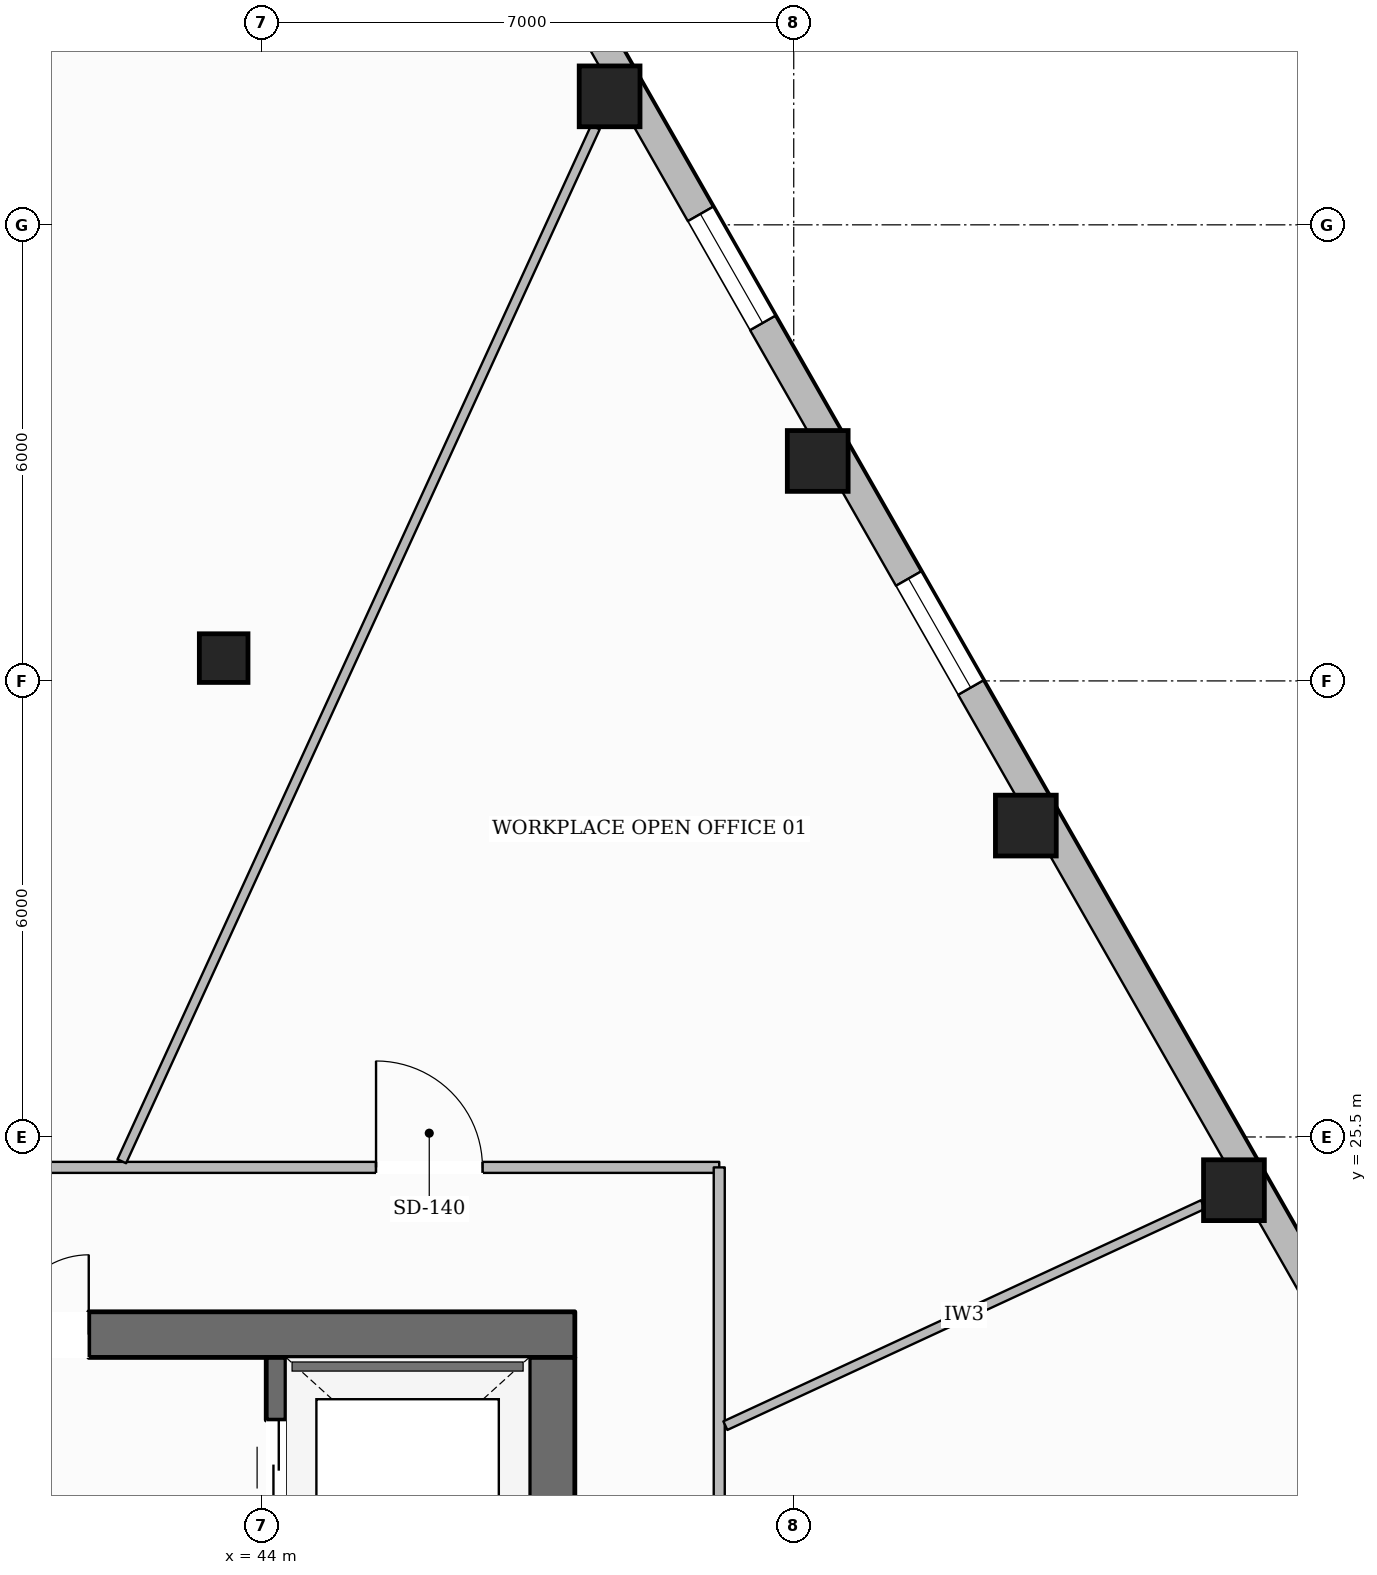
"""IFC4 building model, lengths in metres.
Left out: names, types, materials, properties, quantities, classifications, styles, units other than length and angle.
Written with IfcOpenShell. Run it as: python <this file> out.ifc"""

import sys

from ifc_helpers import new_model, si_unit, direction, frame, frame_2d, origin, origin_2d, place, context, subcontext, project, spatial, rectangle, hollow_rectangle, extrude, element, fill, save


model = new_model("IFC4")
c1 = context("Model", 3, precision=1e-05, world=origin(), true_north=direction((0.0, 1.0)))
c2 = subcontext(c1, "Body", "Model", "MODEL_VIEW")
j1 = project(units=[si_unit("LENGTHUNIT", "METRE"), si_unit("PLANEANGLEUNIT", "RADIAN")], contexts=[c1])
p1 = place(None, origin())
s1 = spatial("IfcSite", under=j1, at=p1, CompositionType="ELEMENT")
p2 = place(p1, origin())
s2 = spatial("IfcBuilding", under=s1, at=p2, CompositionType="ELEMENT")
p3 = place(p2, frame((0.0, 0.0, 21.4)))
s3 = spatial("IfcBuildingStorey", under=s2, at=p3, CompositionType="ELEMENT", Elevation=21.4)
p4 = place(p3, frame((27.88, 22.9, 0.0), z_axis=(0.0, 0.0, 1.0), x_axis=(1.0, 0.0, 0.0)))
e1 = element("IfcWall", 1, at=p4, inside=s3, PredefinedType="SOLIDWALL", context=c2, shape_type="SweptSolid", body=[
    extrude(rectangle(XDim=20.24, YDim=0.6, at=frame_2d((10.12, 0.0))), origin(), (0.0, 0.0, 1.0), 3.59),
])
p5 = place(p4, frame((6.395, 0.0, 0.0)))
e2 = element("IfcOpeningElement", 2, at=p5, cuts=e1, PredefinedType="OPENING", context=c2, shape_type="SweptSolid", body=[
    extrude(rectangle(XDim=1.05, YDim=2.15, at=frame_2d((0.525, 1.075))), frame((0.0, 0.31, 0.0), z_axis=(0.0, -1.0, 0.0), x_axis=(1.0, 0.0, 0.0)), (0.0, 0.0, 1.0), 0.62),
])
p6 = place(p4, frame((12.795, 0.0, 0.0)))
e3 = element("IfcOpeningElement", 3, at=p6, cuts=e1, PredefinedType="OPENING", context=c2, shape_type="SweptSolid", body=[
    extrude(rectangle(XDim=1.05, YDim=2.15, at=frame_2d((0.525, 1.075))), frame((0.0, 0.31, 0.0), z_axis=(0.0, -1.0, 0.0), x_axis=(1.0, 0.0, 0.0)), (0.0, 0.0, 1.0), 0.62),
])
p7 = place(p3, frame((47.82, 9.6, 0.0), z_axis=(0.0, 0.0, 1.0), x_axis=(0.0, 1.0, 0.0)))
e4 = element("IfcWall", 4, at=p7, inside=s3, PredefinedType="SOLIDWALL", context=c2, shape_type="SweptSolid", body=[
    extrude(rectangle(XDim=13.0, YDim=0.6, at=frame_2d((6.5, 0.0))), origin(), (0.0, 0.0, 1.0), 3.59),
])
p8 = place(p7, frame((0.2, 0.0, 0.0)))
e5 = element("IfcOpeningElement", 5, at=p8, cuts=e4, PredefinedType="OPENING", context=c2, shape_type="SweptSolid", body=[
    extrude(rectangle(XDim=1.1, YDim=2.15, at=frame_2d((0.55, 1.075))), frame((0.0, 0.31, 0.0), z_axis=(0.0, -1.0, 0.0), x_axis=(1.0, 0.0, 0.0)), (0.0, 0.0, 1.0), 0.62),
])
p9 = place(p7, frame((8.4, 0.0, 0.0)))
e6 = element("IfcOpeningElement", 6, at=p9, cuts=e4, PredefinedType="OPENING", context=c2, shape_type="SweptSolid", body=[
    extrude(rectangle(XDim=0.9, YDim=2.1, at=frame_2d((0.45, 1.05))), frame((0.0, 0.31, 0.0), z_axis=(0.0, -1.0, 0.0), x_axis=(1.0, 0.0, 0.0)), (0.0, 0.0, 1.0), 0.62),
])
p10 = place(p3, frame((44.19, 9.6, 0.0), z_axis=(0.0, 0.0, 1.0), x_axis=(0.0, 1.0, 0.0)))
e7 = element("IfcWall", 7, at=p10, inside=s3, PredefinedType="SHEAR", context=c2, shape_type="SweptSolid", body=[
    extrude(rectangle(XDim=13.0, YDim=0.26, at=frame_2d((6.5, 0.0))), origin(), (0.0, 0.0, 1.0), 3.59),
])
p11 = place(p10, frame((10.925, 0.0, 0.0)))
e8 = element("IfcOpeningElement", 8, at=p11, cuts=e7, PredefinedType="OPENING", context=c2, shape_type="SweptSolid", body=[
    extrude(rectangle(XDim=1.25, YDim=2.25, at=frame_2d((0.625, 1.125))), frame((0.0, 0.14, 0.0), z_axis=(0.0, -1.0, 0.0), x_axis=(1.0, 0.0, 0.0)), (0.0, 0.0, 1.0), 0.28),
])
for number, where, z_axis, x_axis in (
    (9, (56.792, 24.8, 0.0), (0.0, 0.0, 1.0), (1.0, 0.0, 0.0)),
    (10, (54.054, 29.597, 0.0), (0.0, 0.0, 1.0), (1.0, 0.0, 0.0)),
    (11, (51.316, 34.394, 0.0), (0.0, 0.0, 1.0), (1.0, 0.0, 0.0)),
    (12, (48.578, 39.19, 0.0), (0.0, 0.0, 1.0), (1.0, 0.0, 0.0)),
):
    element("IfcColumn", number, at=place(p3, frame(where, z_axis=z_axis, x_axis=x_axis)), inside=s3, PredefinedType="COLUMN", context=c2, shape_type="SweptSolid", body=[
        extrude(hollow_rectangle(XDim=0.8, YDim=0.8, WallThickness=0.036, at=origin_2d()), origin(), (0.0, 0.0, 1.0), 3.59),
    ])
p12 = place(p3, frame((43.5, 31.8, 0.0), z_axis=(0.0, 0.0, 1.0), x_axis=(1.0, 0.0, 0.0)))
e13 = element("IfcColumn", 13, at=p12, inside=s3, PredefinedType="COLUMN", context=c2, shape_type="SweptSolid", body=[
    extrude(hollow_rectangle(XDim=0.64, YDim=0.64, WallThickness=0.028, at=origin_2d()), origin(), (0.0, 0.0, 1.0), 3.59),
])
p13 = place(p3, frame((45.837, 44.537, 0.0), z_axis=(0.0, 0.0, 1.0), x_axis=(0.495711630902, -0.868487178367, 0.0)))
e14 = element("IfcWall", 14, at=p13, inside=s3, PredefinedType="STANDARD", context=c2, shape_type="SweptSolid", body=[
    extrude(rectangle(XDim=34.092, YDim=0.38, at=frame_2d((17.046, 0.0))), origin(), (0.0, 0.0, 1.0), 2.97),
])
p14 = place(p13, frame((30.031, 0.0, 0.65)))
e15 = element("IfcOpeningElement", 15, at=p14, cuts=e14, PredefinedType="OPENING", context=c2, shape_type="SweptSolid", body=[
    extrude(rectangle(XDim=1.65, YDim=1.75, at=frame_2d((0.825, 0.875))), frame((0.0, 0.2, 0.0), z_axis=(0.0, -1.0, 0.0), x_axis=(1.0, 0.0, 0.0)), (0.0, 0.0, 1.0), 0.4),
])
p15 = place(p13, frame((24.508, 0.0, 0.65)))
e16 = element("IfcOpeningElement", 16, at=p15, cuts=e14, PredefinedType="OPENING", context=c2, shape_type="SweptSolid", body=[
    extrude(rectangle(XDim=1.65, YDim=1.75, at=frame_2d((0.825, 0.875))), frame((0.0, 0.2, 0.0), z_axis=(0.0, -1.0, 0.0), x_axis=(1.0, 0.0, 0.0)), (0.0, 0.0, 1.0), 0.4),
])
p16 = place(p13, frame((13.462, 0.0, 0.65)))
e17 = element("IfcOpeningElement", 17, at=p16, cuts=e14, PredefinedType="OPENING", context=c2, shape_type="SweptSolid", body=[
    extrude(rectangle(XDim=1.65, YDim=1.75, at=frame_2d((0.825, 0.875))), frame((0.0, 0.2, 0.0), z_axis=(0.0, -1.0, 0.0), x_axis=(1.0, 0.0, 0.0)), (0.0, 0.0, 1.0), 0.4),
])
p17 = place(p13, frame((7.939, 0.0, 0.65)))
e18 = element("IfcOpeningElement", 18, at=p17, cuts=e14, PredefinedType="OPENING", context=c2, shape_type="SweptSolid", body=[
    extrude(rectangle(XDim=1.65, YDim=1.75, at=frame_2d((0.825, 0.875))), frame((0.0, 0.2, 0.0), z_axis=(0.0, -1.0, 0.0), x_axis=(1.0, 0.0, 0.0)), (0.0, 0.0, 1.0), 0.4),
])
p18 = place(p13, frame((2.415, 0.0, 0.65)))
e19 = element("IfcOpeningElement", 19, at=p18, cuts=e14, PredefinedType="OPENING", context=c2, shape_type="SweptSolid", body=[
    extrude(rectangle(XDim=1.65, YDim=1.75, at=frame_2d((0.825, 0.875))), frame((0.0, 0.2, 0.0), z_axis=(0.0, -1.0, 0.0), x_axis=(1.0, 0.0, 0.0)), (0.0, 0.0, 1.0), 0.4),
])
p19 = place(p3, frame((39.0, 25.1, 0.0), z_axis=(0.0, 0.0, 1.0), x_axis=(1.0, 0.0, 0.0)))
e20 = element("IfcWall", 20, at=p19, inside=s3, PredefinedType="PARTITIONING", context=c2, shape_type="SweptSolid", body=[
    extrude(rectangle(XDim=11.02, YDim=0.145, at=frame_2d((5.51, 0.0))), origin(), (0.0, 0.0, 1.0), 3.59),
])
p20 = place(p19, frame((6.505, 0.0, 0.0)))
e21 = element("IfcOpeningElement", 21, at=p20, cuts=e20, PredefinedType="OPENING", context=c2, shape_type="SweptSolid", body=[
    extrude(rectangle(XDim=1.4, YDim=2.2, at=frame_2d((0.7, 1.1))), frame((0.0, 0.083, 0.0), z_axis=(0.0, -1.0, 0.0), x_axis=(1.0, 0.0, 0.0)), (0.0, 0.0, 1.0), 0.165),
])
p21 = place(p3, frame((50.02, 25.1, 0.0), z_axis=(0.0, 0.0, 1.0), x_axis=(0.0, -1.0, 0.0)))
e22 = element("IfcWall", 22, at=p21, inside=s3, PredefinedType="PARTITIONING", context=c2, shape_type="SweptSolid", body=[
    extrude(rectangle(XDim=16.0, YDim=0.145, at=frame_2d((8.0, 0.0))), origin(), (0.0, 0.0, 1.0), 3.278),
])
p22 = place(p21, frame((8.916, 0.0, 0.0)))
e23 = element("IfcOpeningElement", 23, at=p22, cuts=e22, PredefinedType="OPENING", context=c2, shape_type="SweptSolid", body=[
    extrude(rectangle(XDim=1.4, YDim=2.2, at=frame_2d((0.7, 1.1))), frame((0.0, 0.083, 0.0), z_axis=(0.0, -1.0, 0.0), x_axis=(1.0, 0.0, 0.0)), (0.0, 0.0, 1.0), 0.165),
])
p23 = place(p3, frame((50.101, 21.702, 0.0), z_axis=(0.0, 0.0, 1.0), x_axis=(0.907458193586, 0.420142388832, 0.0)))
e24 = element("IfcWall", 24, at=p23, inside=s3, PredefinedType="PARTITIONING", context=c2, shape_type="SweptSolid", body=[
    extrude(rectangle(XDim=6.924, YDim=0.125, at=frame_2d((3.462, 0.0))), origin(), (0.0, 0.0, 1.0), 3.057),
])
p24 = place(p3, frame((42.16, 25.18, 0.0), z_axis=(0.0, 0.0, 1.0), x_axis=(0.416471526835, 0.90914875974, 0.0)))
e25 = element("IfcWall", 25, at=p24, inside=s3, PredefinedType="PARTITIONING", context=c2, shape_type="SweptSolid", body=[
    extrude(rectangle(XDim=14.961, YDim=0.125, at=frame_2d((7.481, 0.0))), origin(), (0.0, 0.0, 1.0), 3.057),
])
p25 = place(p16, origin())
e26 = element("IfcWindow", 26, at=p25, inside=s3, PartitioningType="SINGLE_PANEL", PredefinedType="WINDOW", context=c2, shape_type="SweptSolid", body=[
    extrude(rectangle(XDim=1.65, YDim=1.75, at=frame_2d((0.825, 0.875))), frame((0.0, 0.03, 0.0), z_axis=(0.0, -1.0, 0.0), x_axis=(1.0, 0.0, 0.0)), (0.0, 0.0, 1.0), 0.06),
])
fill(e17, e26)
p26 = place(p17, origin())
e27 = element("IfcWindow", 27, at=p26, inside=s3, PartitioningType="SINGLE_PANEL", PredefinedType="WINDOW", context=c2, shape_type="SweptSolid", body=[
    extrude(rectangle(XDim=1.65, YDim=1.75, at=frame_2d((0.825, 0.875))), frame((0.0, 0.03, 0.0), z_axis=(0.0, -1.0, 0.0), x_axis=(1.0, 0.0, 0.0)), (0.0, 0.0, 1.0), 0.06),
])
fill(e18, e27)
p27 = place(p6, origin())
e28 = element("IfcDoor", 28, at=p27, inside=s3, OperationType="SINGLE_SWING_RIGHT", PredefinedType="DOOR", context=c2, shape_type="SweptSolid", body=[
    extrude(rectangle(XDim=1.05, YDim=2.15, at=frame_2d((0.525, 1.075))), frame((0.0, 0.025, 0.0), z_axis=(0.0, -1.0, 0.0), x_axis=(1.0, 0.0, 0.0)), (0.0, 0.0, 1.0), 0.05),
])
fill(e3, e28)
p28 = place(p11, origin())
e29 = element("IfcDoor", 29, at=p28, inside=s3, OperationType="DOUBLE_DOOR_SLIDING", PredefinedType="DOOR", context=c2, shape_type="SweptSolid", body=[
    extrude(rectangle(XDim=1.25, YDim=2.25, at=frame_2d((0.625, 1.125))), frame((0.0, 0.025, 0.0), z_axis=(0.0, -1.0, 0.0), x_axis=(1.0, 0.0, 0.0)), (0.0, 0.0, 1.0), 0.05),
])
fill(e8, e29)
p29 = place(p20, origin())
e30 = element("IfcDoor", 30, at=p29, inside=s3, OperationType="SINGLE_SWING_LEFT", PredefinedType="DOOR", context=c2, shape_type="SweptSolid", body=[
    extrude(rectangle(XDim=1.4, YDim=2.2, at=frame_2d((0.7, 1.1))), frame((0.0, 0.025, 0.0), z_axis=(0.0, -1.0, 0.0), x_axis=(1.0, 0.0, 0.0)), (0.0, 0.0, 1.0), 0.05),
])
fill(e21, e30)
save(model, sys.argv[1])
